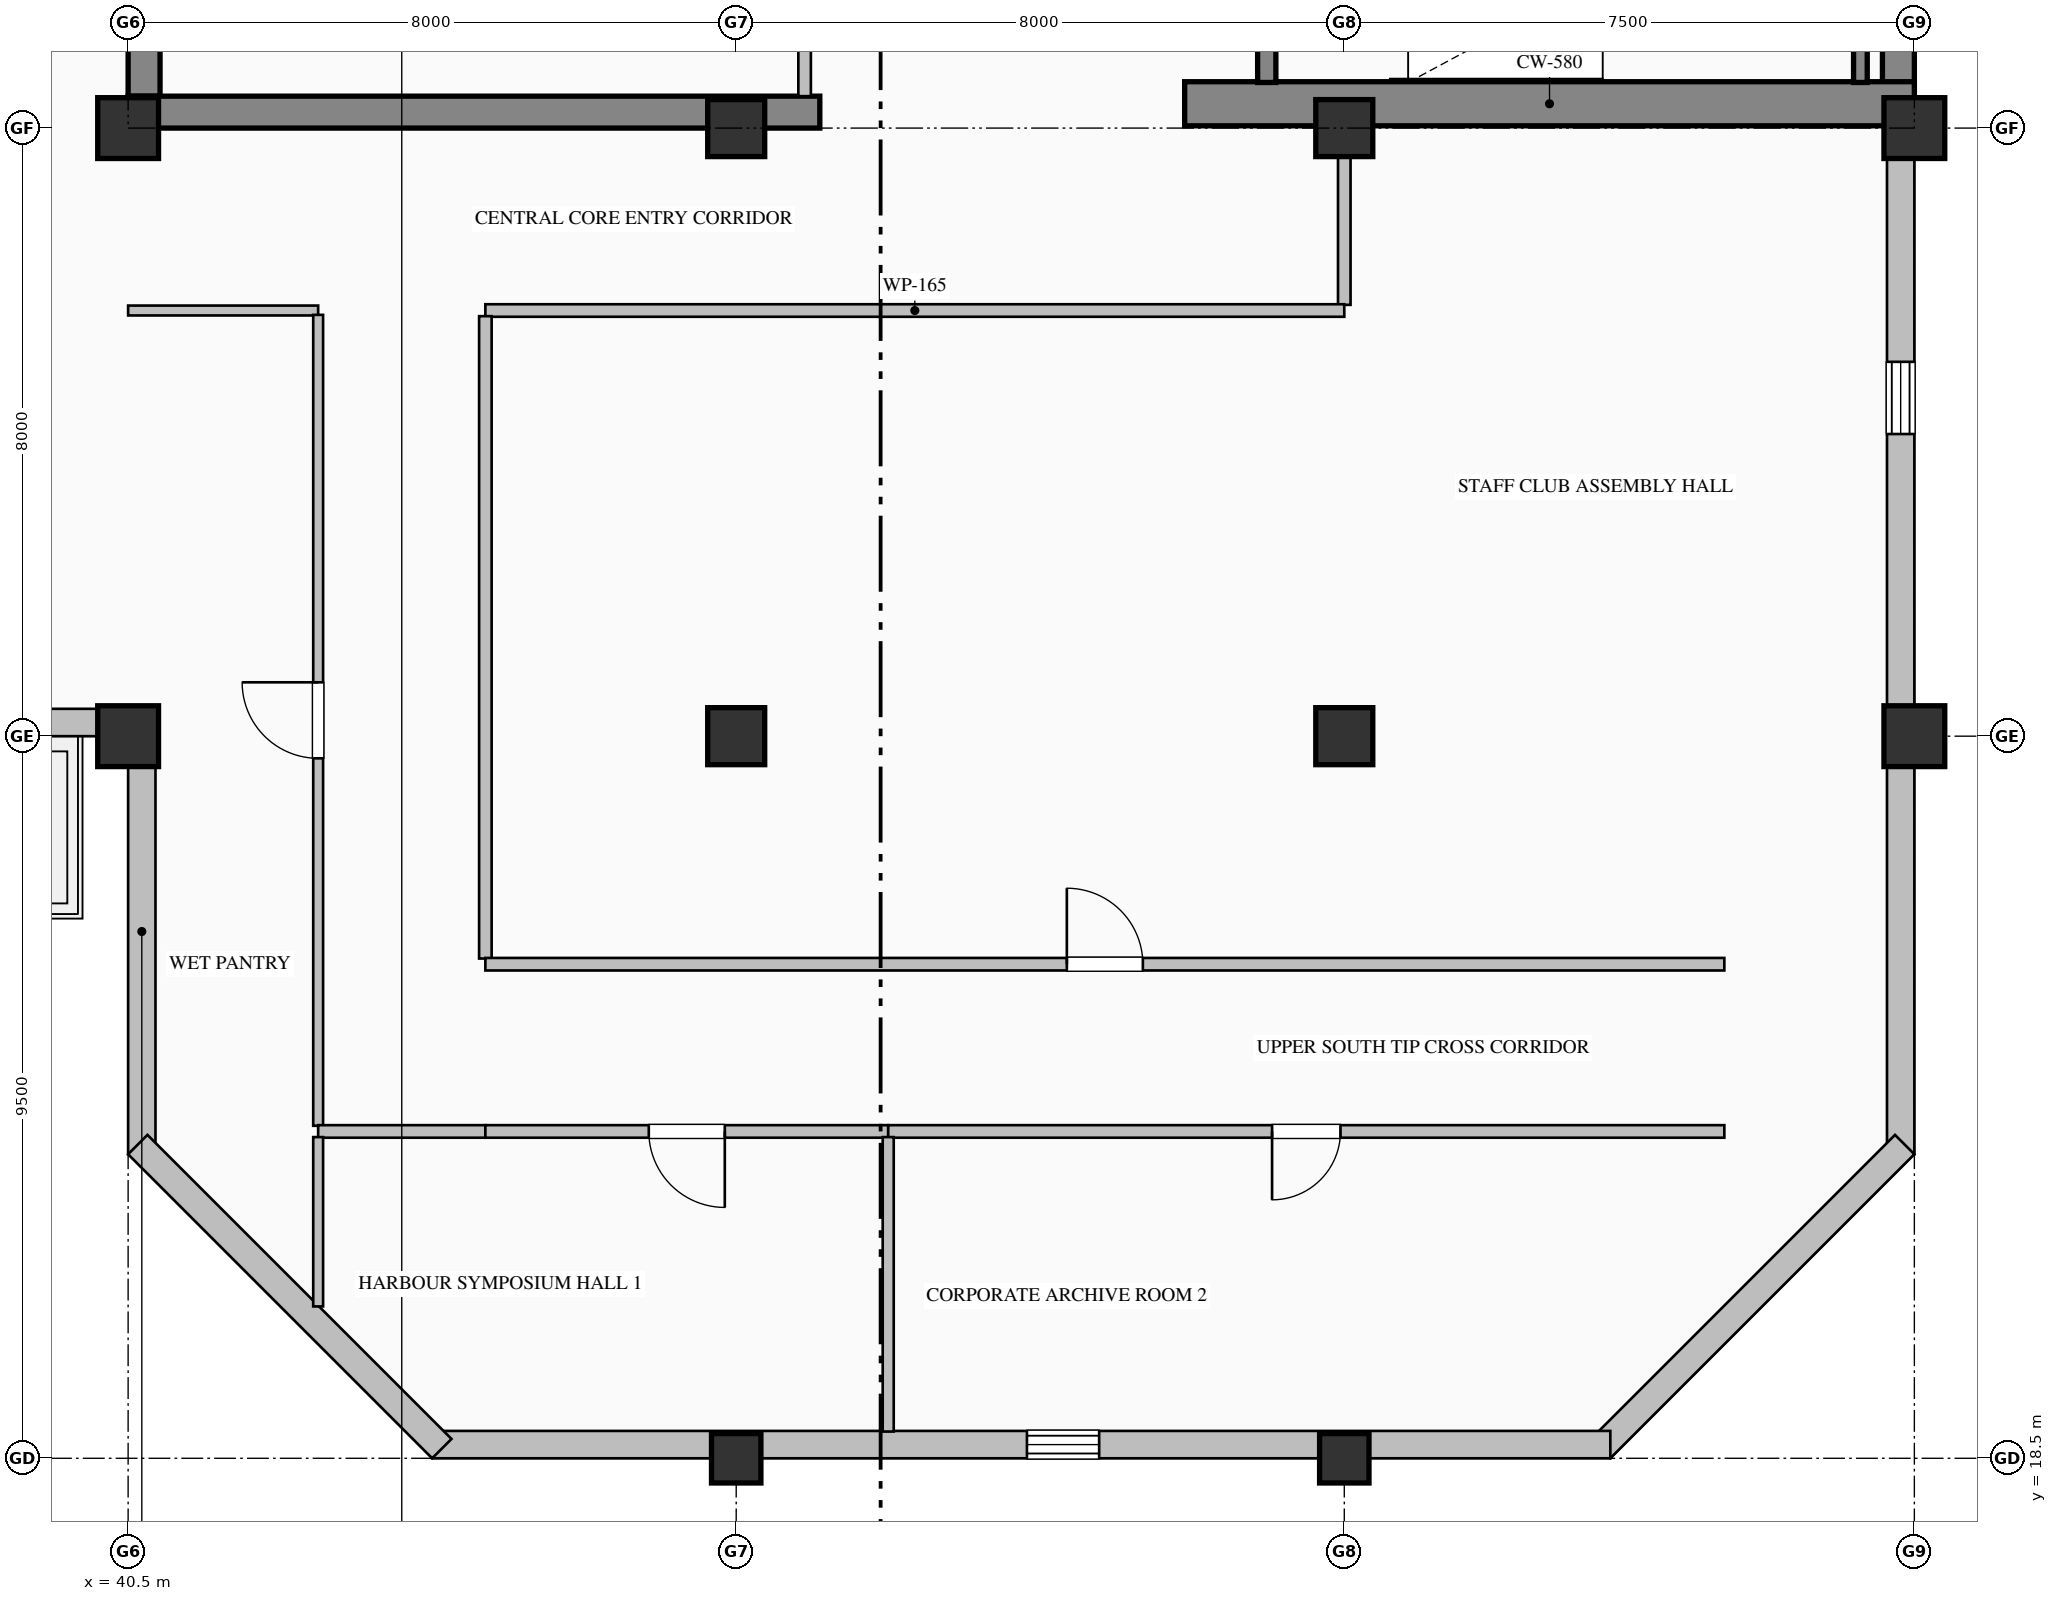
"""IFC4 building model, lengths in metres.
Left out: names, types, materials, properties, quantities, classifications, styles, units other than length and angle.
Written with IfcOpenShell. Run it as: python <this file> out.ifc"""

import sys

from ifc_helpers import new_model, si_unit, direction, frame, frame_2d, origin, origin_2d, place, context, subcontext, project, spatial, rectangle, hollow_rectangle, extrude, element, fill, save


model = new_model("IFC4")
c1 = context("Model", 3, precision=1e-05, world=origin(), true_north=direction((0.0, 1.0)))
c2 = subcontext(c1, "Body", "Model", "MODEL_VIEW")
j1 = project(units=[si_unit("LENGTHUNIT", "METRE"), si_unit("PLANEANGLEUNIT", "RADIAN")], contexts=[c1])
p1 = place(None, origin())
s1 = spatial("IfcSite", under=j1, at=p1, CompositionType="ELEMENT")
p2 = place(p1, origin())
s2 = spatial("IfcBuilding", under=s1, at=p2, CompositionType="ELEMENT")
p3 = place(p2, frame((0.0, 0.0, 323.2)))
s3 = spatial("IfcBuildingStorey", under=s2, at=p3, CompositionType="ELEMENT", Elevation=323.2)
p4 = place(p3, frame((63.79, 36.32, 0.0), z_axis=(0.0, 0.0, 1.0), x_axis=(0.0, 1.0, 0.0)))
e1 = element("IfcWall", 1, at=p4, inside=s3, PredefinedType="SHEAR", context=c2, shape_type="SweptSolid", body=[
    extrude(rectangle(XDim=15.26, YDim=0.42, at=frame_2d((7.63, 0.0))), origin(), (0.0, 0.0, 1.0), 3.785),
])
p5 = place(p3, frame((40.71, 36.42, 0.0), z_axis=(0.0, 0.0, 1.0), x_axis=(0.0, 1.0, 0.0)))
e2 = element("IfcWall", 2, at=p5, inside=s3, PredefinedType="SHEAR", context=c2, shape_type="SweptSolid", body=[
    extrude(rectangle(XDim=7.98, YDim=0.42, at=frame_2d((3.99, 0.0))), origin(), (0.0, 0.0, 1.0), 3.785),
])
p6 = place(p3, frame((40.5, 36.21, 0.0), z_axis=(0.0, 0.0, 1.0), x_axis=(1.0, 0.0, 0.0)))
e3 = element("IfcWall", 3, at=p6, inside=s3, PredefinedType="SHEAR", context=c2, shape_type="SweptSolid", body=[
    extrude(rectangle(XDim=9.1, YDim=0.42, at=frame_2d((4.55, 0.0))), origin(), (0.0, 0.0, 1.0), 3.785),
])
p7 = place(p3, frame((54.4, 36.32, 0.0), z_axis=(0.0, 0.0, 1.0), x_axis=(1.0, 0.0, 0.0)))
e4 = element("IfcWall", 4, at=p7, inside=s3, PredefinedType="SHEAR", context=c2, shape_type="SweptSolid", body=[
    extrude(rectangle(XDim=9.6, YDim=0.58, at=frame_2d((4.8, 0.0))), origin(), (0.0, 0.0, 1.0), 4.0),
])
for number, where, z_axis, x_axis in (
    (5, (40.5, 28.0, 0.0), (0.0, 0.0, 1.0), (1.0, 0.0, 0.0)),
    (6, (40.5, 36.0, 0.0), (0.0, 0.0, 1.0), (1.0, 0.0, 0.0)),
):
    element("IfcColumn", number, at=place(p3, frame(where, z_axis=z_axis, x_axis=x_axis)), inside=s3, PredefinedType="COLUMN", context=c2, shape_type="SweptSolid", body=[
        extrude(hollow_rectangle(XDim=0.8, YDim=0.8, WallThickness=0.032, at=origin_2d()), origin(), (0.0, 0.0, 1.0), 4.0),
    ])
p8 = place(p3, frame((48.5, 18.5, 0.0), z_axis=(0.0, 0.0, 1.0), x_axis=(1.0, 0.0, 0.0)))
e7 = element("IfcColumn", 7, at=p8, inside=s3, PredefinedType="COLUMN", context=c2, shape_type="SweptSolid", body=[
    extrude(hollow_rectangle(XDim=0.65, YDim=0.65, WallThickness=0.028, at=origin_2d()), origin(), (0.0, 0.0, 1.0), 4.0),
])
for number, where, z_axis, x_axis in (
    (8, (48.5, 28.0, 0.0), (0.0, 0.0, 1.0), (1.0, 0.0, 0.0)),
    (9, (48.5, 36.0, 0.0), (0.0, 0.0, 1.0), (1.0, 0.0, 0.0)),
):
    element("IfcColumn", number, at=place(p3, frame(where, z_axis=z_axis, x_axis=x_axis)), inside=s3, PredefinedType="COLUMN", context=c2, shape_type="SweptSolid", body=[
        extrude(rectangle(XDim=0.75, YDim=0.75, at=origin_2d()), origin(), (0.0, 0.0, 1.0), 4.0),
    ])
p9 = place(p3, frame((56.5, 18.5, 0.0), z_axis=(0.0, 0.0, 1.0), x_axis=(1.0, 0.0, 0.0)))
e10 = element("IfcColumn", 10, at=p9, inside=s3, PredefinedType="COLUMN", context=c2, shape_type="SweptSolid", body=[
    extrude(hollow_rectangle(XDim=0.65, YDim=0.65, WallThickness=0.028, at=origin_2d()), origin(), (0.0, 0.0, 1.0), 4.0),
])
for number, where, z_axis, x_axis in (
    (11, (56.5, 28.0, 0.0), (0.0, 0.0, 1.0), (1.0, 0.0, 0.0)),
    (12, (56.5, 36.0, 0.0), (0.0, 0.0, 1.0), (1.0, 0.0, 0.0)),
):
    element("IfcColumn", number, at=place(p3, frame(where, z_axis=z_axis, x_axis=x_axis)), inside=s3, PredefinedType="COLUMN", context=c2, shape_type="SweptSolid", body=[
        extrude(rectangle(XDim=0.75, YDim=0.75, at=origin_2d()), origin(), (0.0, 0.0, 1.0), 4.0),
    ])
for number, where, z_axis, x_axis in (
    (13, (64.0, 28.0, 0.0), (0.0, 0.0, 1.0), (1.0, 0.0, 0.0)),
    (14, (64.0, 36.0, 0.0), (0.0, 0.0, 1.0), (1.0, 0.0, 0.0)),
):
    element("IfcColumn", number, at=place(p3, frame(where, z_axis=z_axis, x_axis=x_axis)), inside=s3, PredefinedType="COLUMN", context=c2, shape_type="SweptSolid", body=[
        extrude(hollow_rectangle(XDim=0.8, YDim=0.8, WallThickness=0.032, at=origin_2d()), origin(), (0.0, 0.0, 1.0), 4.0),
    ])
p10 = place(p3, frame((40.68, 22.5, 0.0), z_axis=(0.0, 0.0, 1.0), x_axis=(0.0, 1.0, 0.0)))
e15 = element("IfcWall", 15, at=p10, inside=s3, PredefinedType="SOLIDWALL", context=c2, shape_type="SweptSolid", body=[
    extrude(rectangle(XDim=5.86, YDim=0.36, at=frame_2d((2.93, 0.0))), origin(), (0.0, 0.0, 1.0), 3.185),
])
p11 = place(p3, frame((40.52, 28.18, 0.0), z_axis=(0.0, 0.0, 1.0), x_axis=(-1.0, 0.0, 0.0)))
e16 = element("IfcWall", 16, at=p11, inside=s3, PredefinedType="SOLIDWALL", context=c2, shape_type="SweptSolid", body=[
    extrude(rectangle(XDim=20.02, YDim=0.36, at=frame_2d((10.01, 0.0))), origin(), (0.0, 0.0, 1.0), 3.185),
])
p12 = place(p11, frame((3.075, 0.0, 0.8)))
e17 = element("IfcOpeningElement", 17, at=p12, cuts=e16, PredefinedType="OPENING", context=c2, shape_type="SweptSolid", body=[
    extrude(rectangle(XDim=1.05, YDim=2.15, at=frame_2d((0.525, 1.075))), frame((0.0, 0.19, 0.0), z_axis=(0.0, -1.0, 0.0), x_axis=(1.0, 0.0, 0.0)), (0.0, 0.0, 1.0), 0.38),
])
p13 = place(p11, frame((13.875, 0.0, 0.8)))
e18 = element("IfcOpeningElement", 18, at=p13, cuts=e16, PredefinedType="OPENING", context=c2, shape_type="SweptSolid", body=[
    extrude(rectangle(XDim=1.05, YDim=2.15, at=frame_2d((0.525, 1.075))), frame((0.0, 0.19, 0.0), z_axis=(0.0, -1.0, 0.0), x_axis=(1.0, 0.0, 0.0)), (0.0, 0.0, 1.0), 0.38),
])
p14 = place(p11, frame((11.395, 0.0, 0.0)))
e19 = element("IfcOpeningElement", 19, at=p14, cuts=e16, PredefinedType="OPENING", context=c2, shape_type="SweptSolid", body=[
    extrude(rectangle(XDim=1.25, YDim=2.25, at=frame_2d((0.625, 1.125))), frame((0.0, 0.19, 0.0), z_axis=(0.0, -1.0, 0.0), x_axis=(1.0, 0.0, 0.0)), (0.0, 0.0, 1.0), 0.38),
])
p15 = place(p3, frame((63.82, 36.05, 0.0), z_axis=(0.0, 0.0, 1.0), x_axis=(0.0, -1.0, 0.0)))
e20 = element("IfcWall", 20, at=p15, inside=s3, PredefinedType="SOLIDWALL", context=c2, shape_type="SweptSolid", body=[
    extrude(rectangle(XDim=13.55, YDim=0.36, at=frame_2d((6.775, 0.0))), origin(), (0.0, 0.0, 1.0), 3.335),
])
p16 = place(p15, frame((3.125, 0.0, 0.9)))
e21 = element("IfcOpeningElement", 21, at=p16, cuts=e20, PredefinedType="OPENING", context=c2, shape_type="SweptSolid", body=[
    extrude(rectangle(XDim=0.95, YDim=1.85, at=frame_2d((0.475, 0.925))), frame((0.0, 0.19, 0.0), z_axis=(0.0, -1.0, 0.0), x_axis=(1.0, 0.0, 0.0)), (0.0, 0.0, 1.0), 0.38),
])
p17 = place(p3, frame((63.873, 22.627, 0.0), z_axis=(0.0, 0.0, 1.0), x_axis=(-0.707106781187, -0.707106781187, 0.0)))
e22 = element("IfcWall", 22, at=p17, inside=s3, PredefinedType="SOLIDWALL", context=c2, shape_type="SweptSolid", body=[
    extrude(rectangle(XDim=5.657, YDim=0.36, at=frame_2d((2.828, 0.0))), origin(), (0.0, 0.0, 1.0), 3.785),
])
p18 = place(p3, frame((60.0, 18.68, 0.0), z_axis=(0.0, 0.0, 1.0), x_axis=(-1.0, 0.0, 0.0)))
e23 = element("IfcWall", 23, at=p18, inside=s3, PredefinedType="SOLIDWALL", context=c2, shape_type="SweptSolid", body=[
    extrude(rectangle(XDim=15.5, YDim=0.36, at=frame_2d((7.75, 0.0))), origin(), (0.0, 0.0, 1.0), 3.335),
])
p19 = place(p18, frame((6.725, 0.0, 0.9)))
e24 = element("IfcOpeningElement", 24, at=p19, cuts=e23, PredefinedType="OPENING", context=c2, shape_type="SweptSolid", body=[
    extrude(rectangle(XDim=0.95, YDim=1.85, at=frame_2d((0.475, 0.925))), frame((0.0, 0.19, 0.0), z_axis=(0.0, -1.0, 0.0), x_axis=(1.0, 0.0, 0.0)), (0.0, 0.0, 1.0), 0.38),
])
p20 = place(p3, frame((44.627, 18.627, 0.0), z_axis=(0.0, 0.0, 1.0), x_axis=(-0.707106781187, 0.707106781187, 0.0)))
e25 = element("IfcWall", 25, at=p20, inside=s3, PredefinedType="SOLIDWALL", context=c2, shape_type="SweptSolid", body=[
    extrude(rectangle(XDim=5.657, YDim=0.36, at=frame_2d((2.828, 0.0))), origin(), (0.0, 0.0, 1.0), 3.785),
])
p21 = place(p3, frame((55.48, 39.75, 0.0), z_axis=(0.0, 0.0, 1.0), x_axis=(0.0, -1.0, 0.0)))
e26 = element("IfcWall", 26, at=p21, inside=s3, PredefinedType="SOLIDWALL", context=c2, shape_type="SweptSolid", body=[
    extrude(rectangle(XDim=3.15, YDim=0.24, at=frame_2d((1.575, 0.0))), origin(), (0.0, 0.0, 1.0), 4.0),
])
p22 = place(p21, frame((1.0, 0.0, 0.0)))
e27 = element("IfcOpeningElement", 27, at=p22, cuts=e26, PredefinedType="OPENING", context=c2, shape_type="SweptSolid", body=[
    extrude(rectangle(XDim=1.15, YDim=2.2, at=frame_2d((0.575, 1.1))), frame((0.0, 0.13, 0.0), z_axis=(0.0, -1.0, 0.0), x_axis=(1.0, 0.0, 0.0)), (0.0, 0.0, 1.0), 0.26),
])
p23 = place(p3, frame((63.29, 36.6, 0.0), z_axis=(0.0, 0.0, 1.0), x_axis=(0.0, 1.0, 0.0)))
e28 = element("IfcWall", 28, at=p23, inside=s3, PredefinedType="SOLIDWALL", context=c2, shape_type="SweptSolid", body=[
    extrude(rectangle(XDim=3.15, YDim=0.18, at=frame_2d((1.575, 0.0))), origin(), (0.0, 0.0, 1.0), 4.0),
])
p24 = place(p3, frame((49.4, 36.42, 0.0), z_axis=(0.0, 0.0, 1.0), x_axis=(0.0, 1.0, 0.0)))
e29 = element("IfcWall", 29, at=p24, inside=s3, PredefinedType="PARTITIONING", context=c2, shape_type="SweptSolid", body=[
    extrude(rectangle(XDim=3.893, YDim=0.165, at=frame_2d((1.947, 0.0))), origin(), (0.0, 0.0, 1.0), 3.027),
])
p25 = place(p24, frame((1.497, 0.0, 0.0)))
e30 = element("IfcOpeningElement", 30, at=p25, cuts=e29, PredefinedType="OPENING", context=c2, shape_type="SweptSolid", body=[
    extrude(rectangle(XDim=0.9, YDim=2.15, at=frame_2d((0.45, 1.075))), frame((0.0, 0.093, 0.0), z_axis=(0.0, -1.0, 0.0), x_axis=(1.0, 0.0, 0.0)), (0.0, 0.0, 1.0), 0.185),
])
p26 = place(p3, frame((56.5, 36.0, 0.0), z_axis=(0.0, 0.0, 1.0), x_axis=(0.0, -1.0, 0.0)))
e31 = element("IfcWall", 31, at=p26, inside=s3, PredefinedType="PARTITIONING", context=c2, shape_type="SweptSolid", body=[
    extrude(rectangle(XDim=2.325, YDim=0.165, at=frame_2d((1.163, 0.0))), origin(), (0.0, 0.0, 1.0), 3.177),
])
p27 = place(p3, frame((56.5, 33.6, 0.0), z_axis=(0.0, 0.0, 1.0), x_axis=(-1.0, 0.0, 0.0)))
e32 = element("IfcWall", 32, at=p27, inside=s3, PredefinedType="PARTITIONING", context=c2, shape_type="SweptSolid", body=[
    extrude(rectangle(XDim=11.3, YDim=0.165, at=frame_2d((5.65, 0.0))), origin(), (0.0, 0.0, 1.0), 3.785),
])
p28 = place(p3, frame((43.0, 33.6, 0.0), z_axis=(0.0, 0.0, 1.0), x_axis=(-1.0, 0.0, 0.0)))
e33 = element("IfcWall", 33, at=p28, inside=s3, PredefinedType="PARTITIONING", context=c2, shape_type="SweptSolid", body=[
    extrude(rectangle(XDim=2.5, YDim=0.13, at=frame_2d((1.25, 0.0))), origin(), (0.0, 0.0, 1.0), 3.785),
])
p29 = place(p3, frame((45.2, 33.525, 0.0), z_axis=(0.0, 0.0, 1.0), x_axis=(0.0, -1.0, 0.0)))
e34 = element("IfcWall", 34, at=p29, inside=s3, PredefinedType="PARTITIONING", context=c2, shape_type="SweptSolid", body=[
    extrude(rectangle(XDim=8.451, YDim=0.165, at=frame_2d((4.226, 0.0))), origin(), (0.0, 0.0, 1.0), 3.785),
])
p30 = place(p3, frame((43.0, 22.875, 0.0), z_axis=(0.0, 0.0, 1.0), x_axis=(0.0, 1.0, 0.0)))
e35 = element("IfcWall", 35, at=p30, inside=s3, PredefinedType="PARTITIONING", context=c2, shape_type="SweptSolid", body=[
    extrude(rectangle(XDim=10.668, YDim=0.13, at=frame_2d((5.334, 0.0))), origin(), (0.0, 0.0, 1.0), 3.785),
])
p31 = place(p30, frame((4.834, 0.0, 0.0)))
e36 = element("IfcOpeningElement", 36, at=p31, cuts=e35, PredefinedType="OPENING", context=c2, shape_type="SweptSolid", body=[
    extrude(rectangle(XDim=1.0, YDim=2.15, at=frame_2d((0.5, 1.075))), frame((0.0, 0.075, 0.0), z_axis=(0.0, -1.0, 0.0), x_axis=(1.0, 0.0, 0.0)), (0.0, 0.0, 1.0), 0.15),
])
p32 = place(p3, frame((45.2, 22.8, 0.0), z_axis=(0.0, 0.0, 1.0), x_axis=(-1.0, 0.0, 0.0)))
e37 = element("IfcWall", 37, at=p32, inside=s3, PredefinedType="PARTITIONING", context=c2, shape_type="SweptSolid", body=[
    extrude(rectangle(XDim=2.2, YDim=0.165, at=frame_2d((1.1, 0.0))), origin(), (0.0, 0.0, 1.0), 3.785),
])
p33 = place(p3, frame((45.2, 25.0, 0.0), z_axis=(0.0, 0.0, 1.0), x_axis=(1.0, 0.0, 0.0)))
e38 = element("IfcWall", 38, at=p33, inside=s3, PredefinedType="PARTITIONING", context=c2, shape_type="SweptSolid", body=[
    extrude(rectangle(XDim=16.3, YDim=0.165, at=frame_2d((8.15, 0.0))), origin(), (0.0, 0.0, 1.0), 3.785),
])
p34 = place(p33, frame((7.65, 0.0, 0.0)))
e39 = element("IfcOpeningElement", 39, at=p34, cuts=e38, PredefinedType="OPENING", context=c2, shape_type="SweptSolid", body=[
    extrude(rectangle(XDim=1.0, YDim=2.15, at=frame_2d((0.5, 1.075))), frame((0.0, 0.093, 0.0), z_axis=(0.0, -1.0, 0.0), x_axis=(1.0, 0.0, 0.0)), (0.0, 0.0, 1.0), 0.185),
])
p35 = place(p3, frame((50.5, 22.8, 0.0), z_axis=(0.0, 0.0, 1.0), x_axis=(-1.0, 0.0, 0.0)))
e40 = element("IfcWall", 40, at=p35, inside=s3, PredefinedType="PARTITIONING", context=c2, shape_type="SweptSolid", body=[
    extrude(rectangle(XDim=5.3, YDim=0.165, at=frame_2d((2.65, 0.0))), origin(), (0.0, 0.0, 1.0), 3.785),
])
p36 = place(p35, frame((2.15, 0.0, 0.0)))
e41 = element("IfcOpeningElement", 41, at=p36, cuts=e40, PredefinedType="OPENING", context=c2, shape_type="SweptSolid", body=[
    extrude(rectangle(XDim=1.0, YDim=2.15, at=frame_2d((0.5, 1.075))), frame((0.0, 0.093, 0.0), z_axis=(0.0, -1.0, 0.0), x_axis=(1.0, 0.0, 0.0)), (0.0, 0.0, 1.0), 0.185),
])
p37 = place(p3, frame((61.5, 22.8, 0.0), z_axis=(0.0, 0.0, 1.0), x_axis=(-1.0, 0.0, 0.0)))
e42 = element("IfcWall", 42, at=p37, inside=s3, PredefinedType="PARTITIONING", context=c2, shape_type="SweptSolid", body=[
    extrude(rectangle(XDim=11.0, YDim=0.165, at=frame_2d((5.5, 0.0))), origin(), (0.0, 0.0, 1.0), 3.785),
])
p38 = place(p37, frame((5.05, 0.0, 0.0)))
e43 = element("IfcOpeningElement", 43, at=p38, cuts=e42, PredefinedType="OPENING", context=c2, shape_type="SweptSolid", body=[
    extrude(rectangle(XDim=0.9, YDim=2.15, at=frame_2d((0.45, 1.075))), frame((0.0, 0.093, 0.0), z_axis=(0.0, -1.0, 0.0), x_axis=(1.0, 0.0, 0.0)), (0.0, 0.0, 1.0), 0.185),
])
p39 = place(p3, frame((43.0, 22.726, 0.0), z_axis=(0.0, 0.0, 1.0), x_axis=(0.0, -1.0, 0.0)))
e44 = element("IfcWall", 44, at=p39, inside=s3, PredefinedType="PARTITIONING", context=c2, shape_type="SweptSolid", body=[
    extrude(rectangle(XDim=2.228, YDim=0.13, at=frame_2d((1.114, 0.0))), origin(), (0.0, 0.0, 1.0), 3.785),
])
p40 = place(p3, frame((50.5, 22.726, 0.0), z_axis=(0.0, 0.0, 1.0), x_axis=(0.0, -1.0, 0.0)))
e45 = element("IfcWall", 45, at=p40, inside=s3, PredefinedType="PARTITIONING", context=c2, shape_type="SweptSolid", body=[
    extrude(rectangle(XDim=3.874, YDim=0.145, at=frame_2d((1.937, 0.0))), origin(), (0.0, 0.0, 1.0), 3.785),
])
p41 = place(p16, origin())
e46 = element("IfcWindow", 46, at=p41, inside=s3, PartitioningType="SINGLE_PANEL", PredefinedType="WINDOW", context=c2, shape_type="SweptSolid", body=[
    extrude(rectangle(XDim=0.95, YDim=1.85, at=frame_2d((0.475, 0.925))), frame((0.0, 0.15, 0.0), z_axis=(0.0, -1.0, 0.0), x_axis=(1.0, 0.0, 0.0)), (0.0, 0.0, 1.0), 0.06),
])
fill(e21, e46)
p42 = place(p19, origin())
e47 = element("IfcWindow", 47, at=p42, inside=s3, PartitioningType="SINGLE_PANEL", PredefinedType="WINDOW", context=c2, shape_type="SweptSolid", body=[
    extrude(rectangle(XDim=0.95, YDim=1.85, at=frame_2d((0.475, 0.925))), frame((0.0, 0.15, 0.0), z_axis=(0.0, -1.0, 0.0), x_axis=(1.0, 0.0, 0.0)), (0.0, 0.0, 1.0), 0.06),
])
fill(e24, e47)
p43 = place(p34, origin())
e48 = element("IfcDoor", 48, at=p43, inside=s3, OperationType="SINGLE_SWING_LEFT", PredefinedType="DOOR", context=c2, shape_type="SweptSolid", body=[
    extrude(rectangle(XDim=1.0, YDim=2.15, at=frame_2d((0.5, 1.075))), frame((0.0, 0.025, 0.0), z_axis=(0.0, -1.0, 0.0), x_axis=(1.0, 0.0, 0.0)), (0.0, 0.0, 1.0), 0.05),
])
fill(e39, e48)
p44 = place(p31, origin())
e49 = element("IfcDoor", 49, at=p44, inside=s3, OperationType="SINGLE_SWING_RIGHT", PredefinedType="DOOR", context=c2, shape_type="SweptSolid", body=[
    extrude(rectangle(XDim=1.0, YDim=2.15, at=frame_2d((0.5, 1.075))), frame((0.0, 0.025, 0.0), z_axis=(0.0, -1.0, 0.0), x_axis=(1.0, 0.0, 0.0)), (0.0, 0.0, 1.0), 0.05),
])
fill(e36, e49)
p45 = place(p36, origin())
e50 = element("IfcDoor", 50, at=p45, inside=s3, OperationType="SINGLE_SWING_LEFT", PredefinedType="DOOR", context=c2, shape_type="SweptSolid", body=[
    extrude(rectangle(XDim=1.0, YDim=2.15, at=frame_2d((0.5, 1.075))), frame((0.0, 0.025, 0.0), z_axis=(0.0, -1.0, 0.0), x_axis=(1.0, 0.0, 0.0)), (0.0, 0.0, 1.0), 0.05),
])
fill(e41, e50)
p46 = place(p38, origin())
e51 = element("IfcDoor", 51, at=p46, inside=s3, OperationType="SINGLE_SWING_RIGHT", PredefinedType="DOOR", context=c2, shape_type="SweptSolid", body=[
    extrude(rectangle(XDim=0.9, YDim=2.15, at=frame_2d((0.45, 1.075))), frame((0.0, 0.025, 0.0), z_axis=(0.0, -1.0, 0.0), x_axis=(1.0, 0.0, 0.0)), (0.0, 0.0, 1.0), 0.05),
])
fill(e43, e51)
save(model, sys.argv[1])
